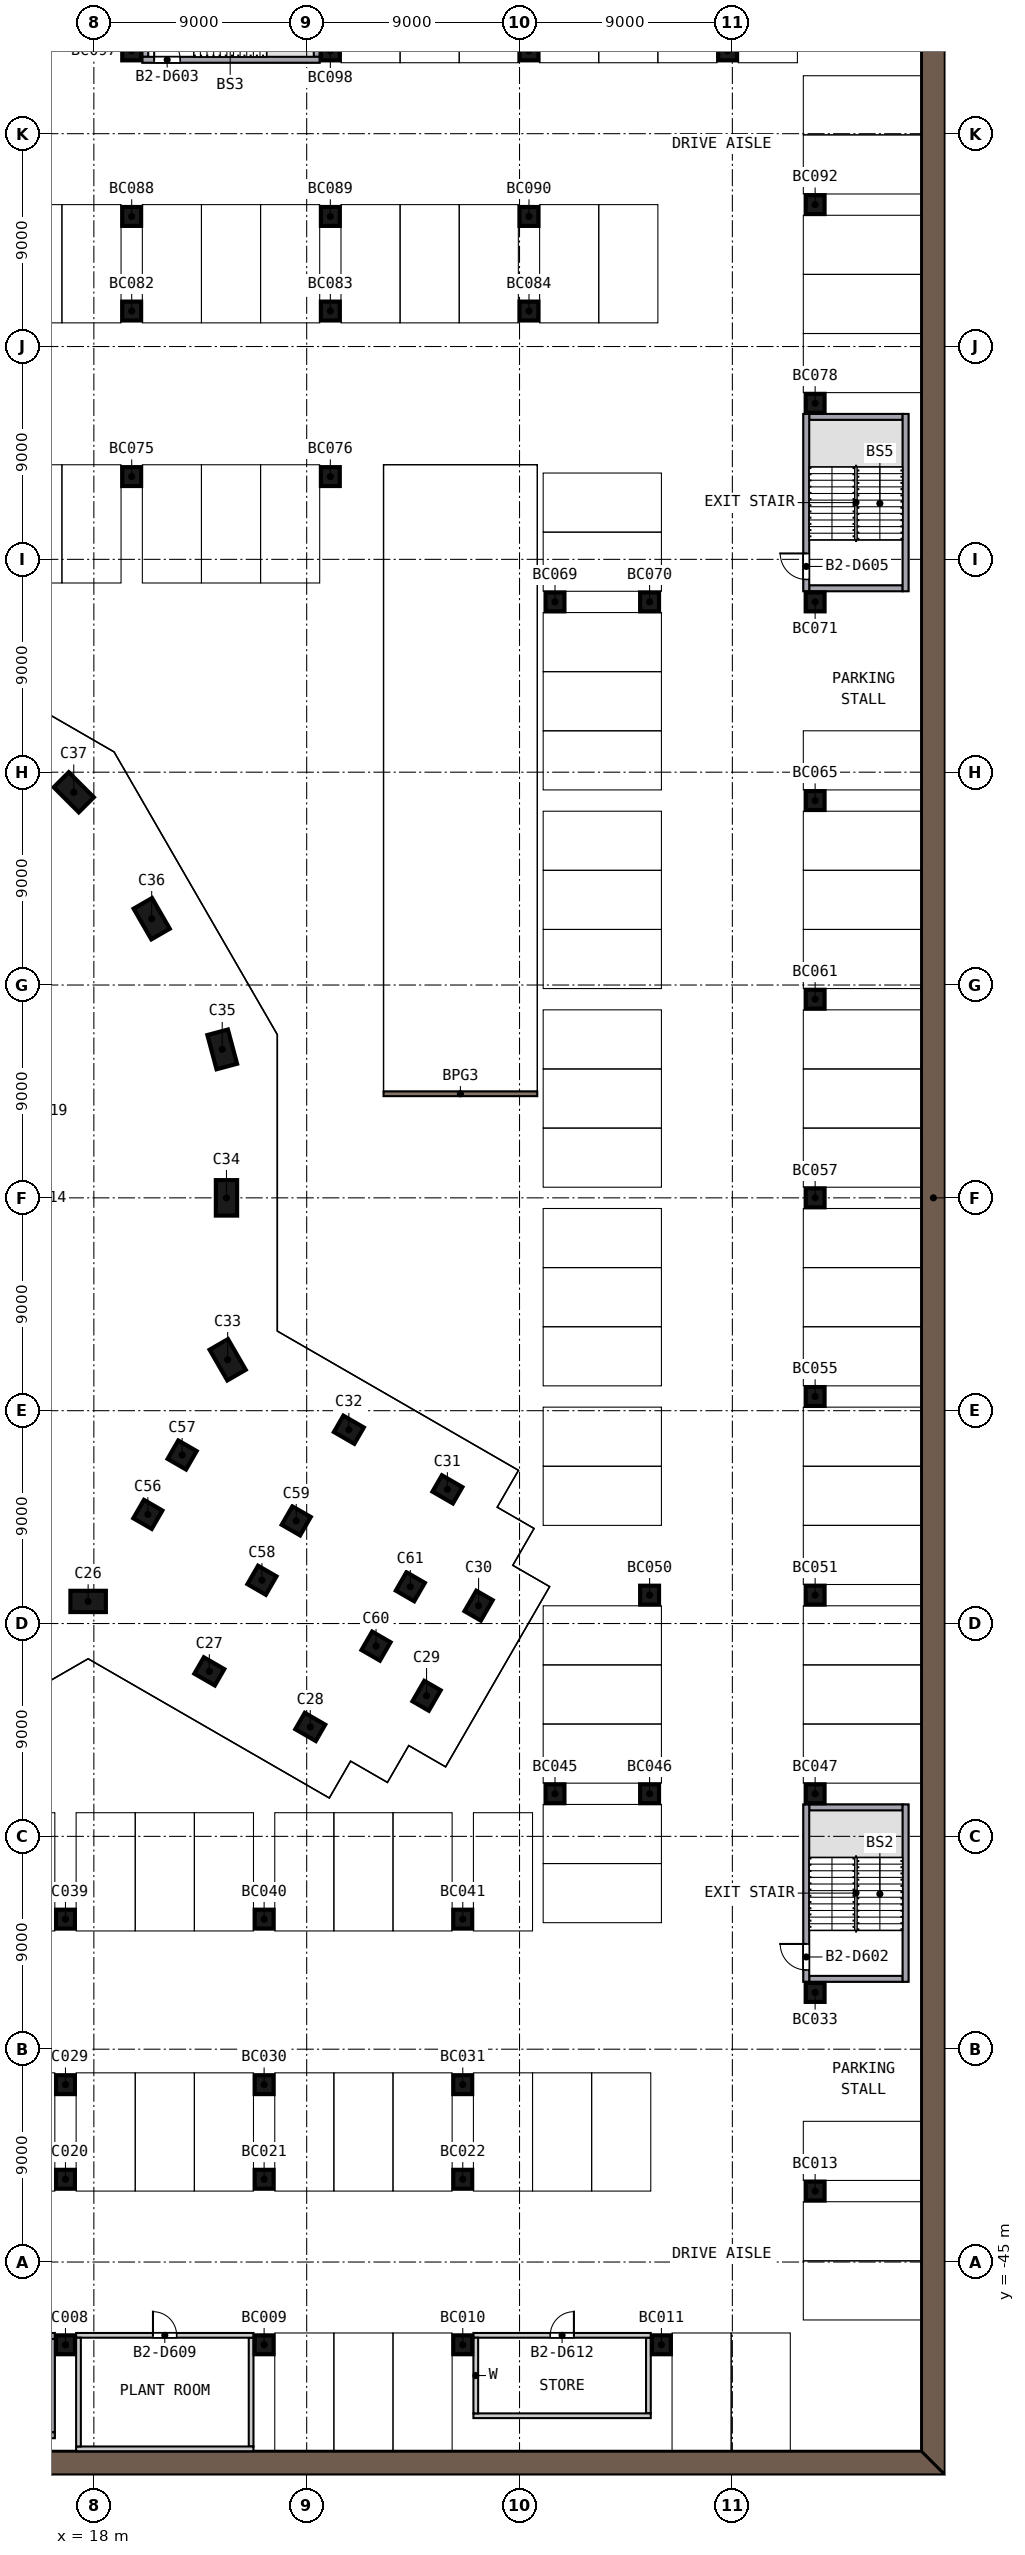
"""IFC4 building model, lengths in metres.
Left out: names, types, materials, properties, quantities, classifications, styles, units other than length and angle.
Written with IfcOpenShell. Run it as: python <this file> out.ifc"""

import sys

from ifc_helpers import new_model, si_unit, direction, frame, frame_2d, origin, origin_2d, place, context, subcontext, project, spatial, polyline, rectangle, outline, extrude, element, fill, save


model = new_model("IFC4")
c1 = context("Model", 3, precision=1e-05, world=origin(), true_north=direction((0.0, 1.0)))
c2 = subcontext(c1, "Body", "Model", "MODEL_VIEW")
j1 = project(units=[si_unit("LENGTHUNIT", "METRE"), si_unit("PLANEANGLEUNIT", "RADIAN")], contexts=[c1])
p1 = place(None, origin())
s1 = spatial("IfcSite", under=j1, at=p1, CompositionType="ELEMENT")
p2 = place(p1, origin())
s2 = spatial("IfcBuilding", under=s1, at=p2, CompositionType="ELEMENT")
p3 = place(p2, frame((0.0, 0.0, -7.8)))
s3 = spatial("IfcBuildingStorey", under=s2, at=p3, CompositionType="ELEMENT", Elevation=-7.8)
p4 = place(p3, frame((17.758, -17.065, 0.0), z_axis=(0.0, 0.0, 1.0), x_axis=(-1.0, 0.0, 0.0)))
e1 = element("IfcColumn", 1, at=p4, inside=s3, PredefinedType="COLUMN", context=c2, shape_type="SweptSolid", body=[
    extrude(rectangle(XDim=1.5, YDim=0.9, at=origin_2d()), origin(), (0.0, 0.0, 1.0), 3.45),
])
for number, where, z_axis, x_axis in (
    (2, (22.883, -20.024, 0.0), (0.0, 0.0, 1.0), (0.866, -0.5, 0.0)),
    (3, (27.151, -22.373, 0.0), (0.0, 0.0, 1.0), (0.866, -0.5, 0.0)),
    (4, (32.069, -21.055, 0.0), (0.0, 0.0, 1.0), (0.5, 0.866, 0.0)),
    (5, (34.269, -17.245, 0.0), (0.0, 0.0, 1.0), (0.5, 0.866, 0.0)),
    (6, (32.951, -12.327, 0.0), (0.0, 0.0, 1.0), (-0.866, 0.5, 0.0)),
    (7, (28.783, -9.805, 0.0), (0.0, 0.0, 1.0), (-0.866, 0.5, 0.0)),
):
    element("IfcColumn", number, at=place(p3, frame(where, z_axis=z_axis, x_axis=x_axis)), inside=s3, PredefinedType="COLUMN", context=c2, shape_type="SweptSolid", body=[
        extrude(rectangle(XDim=1.0, YDim=0.8, at=origin_2d()), origin(), (0.0, 0.0, 1.0), 3.45),
    ])
for number, where, z_axis, x_axis in (
    (8, (23.658, -6.846, 0.0), (0.0, 0.0, 1.0), (0.5, -0.866, 0.0)),
    (9, (23.608, 0.0, 0.0), (0.0, 0.0, 1.0), (0.0, 1.0, 0.0)),
    (10, (23.428, 6.278, 0.0), (0.0, 0.0, 1.0), (0.259, -0.966, 0.0)),
    (11, (20.445, 11.804, 0.0), (0.0, 0.0, 1.0), (-0.5, 0.866, 0.0)),
    (12, (17.151, 17.151, 0.0), (0.0, 0.0, 1.0), (0.707, -0.707, 0.0)),
):
    element("IfcColumn", number, at=place(p3, frame(where, z_axis=z_axis, x_axis=x_axis)), inside=s3, PredefinedType="COLUMN", context=c2, shape_type="SweptSolid", body=[
        extrude(rectangle(XDim=1.5, YDim=0.9, at=origin_2d()), origin(), (0.0, 0.0, 1.0), 3.45),
    ])
for number, where, z_axis, x_axis in (
    (13, (20.283, -13.385, 0.0), (0.0, 0.0, 1.0), (0.866, -0.5, 0.0)),
    (14, (21.733, -10.873, 0.0), (0.0, 0.0, 1.0), (0.866, -0.5, 0.0)),
    (15, (25.108, -16.17, 0.0), (0.0, 0.0, 1.0), (0.866, -0.5, 0.0)),
    (16, (26.558, -13.659, 0.0), (0.0, 0.0, 1.0), (0.866, -0.5, 0.0)),
    (17, (29.932, -18.956, 0.0), (0.0, 0.0, 1.0), (0.866, -0.5, 0.0)),
    (18, (31.382, -16.444, 0.0), (0.0, 0.0, 1.0), (0.866, -0.5, 0.0)),
):
    element("IfcColumn", number, at=place(p3, frame(where, z_axis=z_axis, x_axis=x_axis)), inside=s3, PredefinedType="COLUMN", context=c2, shape_type="SweptSolid", body=[
        extrude(rectangle(XDim=0.9, YDim=0.9, at=origin_2d()), origin(), (0.0, 0.0, 1.0), 3.45),
    ])
p5 = place(p3, origin())
e19 = element("IfcWall", 19, at=p5, inside=s3, PredefinedType="SOLIDWALL", context=c2, shape_type="SweptSolid", body=[
    extrude(outline(polyline([(-54.0, -54.0), (54.0, -54.0), (53.0, -53.0), (-53.0, -53.0), (-54.0, -54.0)])), origin(), (0.0, 0.0, 1.0), 3.9),
])
p6 = place(p3, origin())
e20 = element("IfcWall", 20, at=p6, inside=s3, PredefinedType="SOLIDWALL", context=c2, shape_type="SweptSolid", body=[
    extrude(outline(polyline([(54.0, -54.0), (54.0, 54.0), (53.0, 53.0), (53.0, -53.0), (54.0, -54.0)])), origin(), (0.0, 0.0, 1.0), 3.9),
])
for number, where, z_axis, x_axis in (
    (21, (16.8, -48.5, 0.0), (0.0, 0.0, 1.0), (1.0, 0.0, 0.0)),
    (22, (25.2, -48.5, 0.0), (0.0, 0.0, 1.0), (1.0, 0.0, 0.0)),
    (23, (33.6, -48.5, 0.0), (0.0, 0.0, 1.0), (1.0, 0.0, 0.0)),
    (24, (42.0, -48.5, 0.0), (0.0, 0.0, 1.0), (1.0, 0.0, 0.0)),
    (25, (48.5, -42.0, 0.0), (0.0, 0.0, 1.0), (1.0, 0.0, 0.0)),
    (26, (16.8, -41.5, 0.0), (0.0, 0.0, 1.0), (1.0, 0.0, 0.0)),
    (27, (25.2, -41.5, 0.0), (0.0, 0.0, 1.0), (1.0, 0.0, 0.0)),
    (28, (33.6, -41.5, 0.0), (0.0, 0.0, 1.0), (1.0, 0.0, 0.0)),
    (29, (16.8, -37.5, 0.0), (0.0, 0.0, 1.0), (1.0, 0.0, 0.0)),
    (30, (25.2, -37.5, 0.0), (0.0, 0.0, 1.0), (1.0, 0.0, 0.0)),
    (31, (33.6, -37.5, 0.0), (0.0, 0.0, 1.0), (1.0, 0.0, 0.0)),
    (32, (48.5, -33.6, 0.0), (0.0, 0.0, 1.0), (1.0, 0.0, 0.0)),
    (33, (16.8, -30.5, 0.0), (0.0, 0.0, 1.0), (1.0, 0.0, 0.0)),
    (34, (25.2, -30.5, 0.0), (0.0, 0.0, 1.0), (1.0, 0.0, 0.0)),
    (35, (33.6, -30.5, 0.0), (0.0, 0.0, 1.0), (1.0, 0.0, 0.0)),
    (36, (37.5, -25.2, 0.0), (0.0, 0.0, 1.0), (1.0, 0.0, 0.0)),
    (37, (41.5, -25.2, 0.0), (0.0, 0.0, 1.0), (1.0, 0.0, 0.0)),
    (38, (48.5, -25.2, 0.0), (0.0, 0.0, 1.0), (1.0, 0.0, 0.0)),
    (39, (41.5, -16.8, 0.0), (0.0, 0.0, 1.0), (1.0, 0.0, 0.0)),
    (40, (48.5, -16.8, 0.0), (0.0, 0.0, 1.0), (1.0, 0.0, 0.0)),
    (41, (48.5, -8.4, 0.0), (0.0, 0.0, 1.0), (1.0, 0.0, 0.0)),
    (42, (48.5, 0.0, 0.0), (0.0, 0.0, 1.0), (1.0, 0.0, 0.0)),
    (43, (48.5, 8.4, 0.0), (0.0, 0.0, 1.0), (1.0, 0.0, 0.0)),
    (44, (48.5, 16.8, 0.0), (0.0, 0.0, 1.0), (1.0, 0.0, 0.0)),
    (45, (37.5, 25.2, 0.0), (0.0, 0.0, 1.0), (1.0, 0.0, 0.0)),
    (46, (41.5, 25.2, 0.0), (0.0, 0.0, 1.0), (1.0, 0.0, 0.0)),
    (47, (48.5, 25.2, 0.0), (0.0, 0.0, 1.0), (1.0, 0.0, 0.0)),
    (48, (19.6, 30.5, 0.0), (0.0, 0.0, 1.0), (1.0, 0.0, 0.0)),
    (49, (28.0, 30.5, 0.0), (0.0, 0.0, 1.0), (1.0, 0.0, 0.0)),
    (50, (48.5, 33.6, 0.0), (0.0, 0.0, 1.0), (1.0, 0.0, 0.0)),
    (51, (19.6, 37.5, 0.0), (0.0, 0.0, 1.0), (1.0, 0.0, 0.0)),
    (52, (28.0, 37.5, 0.0), (0.0, 0.0, 1.0), (1.0, 0.0, 0.0)),
    (53, (36.4, 37.5, 0.0), (0.0, 0.0, 1.0), (1.0, 0.0, 0.0)),
    (54, (19.6, 41.5, 0.0), (0.0, 0.0, 1.0), (1.0, 0.0, 0.0)),
    (55, (28.0, 41.5, 0.0), (0.0, 0.0, 1.0), (1.0, 0.0, 0.0)),
    (56, (36.4, 41.5, 0.0), (0.0, 0.0, 1.0), (1.0, 0.0, 0.0)),
    (57, (48.5, 42.0, 0.0), (0.0, 0.0, 1.0), (1.0, 0.0, 0.0)),
    (58, (19.6, 48.5, 0.0), (0.0, 0.0, 1.0), (1.0, 0.0, 0.0)),
    (59, (28.0, 48.5, 0.0), (0.0, 0.0, 1.0), (1.0, 0.0, 0.0)),
    (60, (36.4, 48.5, 0.0), (0.0, 0.0, 1.0), (1.0, 0.0, 0.0)),
    (61, (44.8, 48.5, 0.0), (0.0, 0.0, 1.0), (1.0, 0.0, 0.0)),
):
    element("IfcColumn", number, at=place(p3, frame(where, z_axis=z_axis, x_axis=x_axis)), inside=s3, PredefinedType="COLUMN", context=c2, shape_type="SweptSolid", body=[
        extrude(rectangle(XDim=0.8, YDim=0.8, at=origin_2d()), origin(), (0.0, 0.0, 1.0), 3.9),
    ])
p7 = place(p3, frame((36.75, 4.4, 0.0), z_axis=(0.0, 0.0, 1.0), x_axis=(-1.0, 0.0, 0.0)))
e62 = element("IfcWall", 62, at=p7, inside=s3, PredefinedType="PARAPET", context=c2, shape_type="SweptSolid", body=[
    extrude(rectangle(XDim=6.5, YDim=0.2, at=frame_2d((3.25, 0.0))), origin(), (0.0, 0.0, 1.0), 1.12),
])
p8 = place(p3, frame((48.125, -33.15, 0.0), z_axis=(0.0, 0.0, 1.0), x_axis=(0.0, 1.0, 0.0)))
e63 = element("IfcWall", 63, at=p8, inside=s3, PredefinedType="SOLIDWALL", context=c2, shape_type="SweptSolid", body=[
    extrude(rectangle(XDim=7.5, YDim=0.25, at=frame_2d((3.75, 0.0))), origin(), (0.0, 0.0, 1.0), 3.9),
])
p9 = place(p8, frame((0.5, 0.0, 0.0)))
e64 = element("IfcOpeningElement", 64, at=p9, cuts=e63, PredefinedType="OPENING", context=c2, shape_type="SweptSolid", body=[
    extrude(rectangle(XDim=1.1, YDim=2.1, at=frame_2d((0.55, 1.05))), frame((0.0, 0.135, 0.0), z_axis=(0.0, -1.0, 0.0), x_axis=(1.0, 0.0, 0.0)), (0.0, 0.0, 1.0), 0.27),
])
p10 = place(p3, frame((52.325, -33.15, 0.0), z_axis=(0.0, 0.0, 1.0), x_axis=(0.0, 1.0, 0.0)))
e65 = element("IfcWall", 65, at=p10, inside=s3, PredefinedType="SOLIDWALL", context=c2, shape_type="SweptSolid", body=[
    extrude(rectangle(XDim=7.5, YDim=0.25, at=frame_2d((3.75, 0.0))), origin(), (0.0, 0.0, 1.0), 3.9),
])
for number, where, z_axis, x_axis in (
    (66, (52.2, -33.025, 0.0), (0.0, 0.0, 1.0), (-1.0, 0.0, 0.0)),
    (67, (52.2, -25.775, 0.0), (0.0, 0.0, 1.0), (-1.0, 0.0, 0.0)),
):
    element("IfcWall", number, at=place(p3, frame(where, z_axis=z_axis, x_axis=x_axis)), inside=s3, PredefinedType="SOLIDWALL", context=c2, shape_type="SweptSolid", body=[
        extrude(rectangle(XDim=3.95, YDim=0.25, at=frame_2d((1.975, 0.0))), origin(), (0.0, 0.0, 1.0), 3.9),
    ])
p11 = place(p3, frame((20.05, 48.125, 0.0), z_axis=(0.0, 0.0, 1.0), x_axis=(1.0, 0.0, 0.0)))
e68 = element("IfcWall", 68, at=p11, inside=s3, PredefinedType="SOLIDWALL", context=c2, shape_type="SweptSolid", body=[
    extrude(rectangle(XDim=7.5, YDim=0.25, at=frame_2d((3.75, 0.0))), origin(), (0.0, 0.0, 1.0), 3.9),
])
p12 = place(p11, frame((0.5, 0.0, 0.0)))
e69 = element("IfcOpeningElement", 69, at=p12, cuts=e68, PredefinedType="OPENING", context=c2, shape_type="SweptSolid", body=[
    extrude(rectangle(XDim=1.1, YDim=2.1, at=frame_2d((0.55, 1.05))), frame((0.0, 0.135, 0.0), z_axis=(0.0, -1.0, 0.0), x_axis=(1.0, 0.0, 0.0)), (0.0, 0.0, 1.0), 0.27),
])
for number, where, z_axis, x_axis in (
    (70, (20.175, 48.25, 0.0), (0.0, 0.0, 1.0), (0.0, 1.0, 0.0)),
    (71, (27.425, 48.25, 0.0), (0.0, 0.0, 1.0), (0.0, 1.0, 0.0)),
):
    element("IfcWall", number, at=place(p3, frame(where, z_axis=z_axis, x_axis=x_axis)), inside=s3, PredefinedType="SOLIDWALL", context=c2, shape_type="SweptSolid", body=[
        extrude(rectangle(XDim=3.95, YDim=0.25, at=frame_2d((1.975, 0.0))), origin(), (0.0, 0.0, 1.0), 3.9),
    ])
p13 = place(p3, frame((48.125, 25.65, 0.0), z_axis=(0.0, 0.0, 1.0), x_axis=(0.0, 1.0, 0.0)))
e72 = element("IfcWall", 72, at=p13, inside=s3, PredefinedType="SOLIDWALL", context=c2, shape_type="SweptSolid", body=[
    extrude(rectangle(XDim=7.5, YDim=0.25, at=frame_2d((3.75, 0.0))), origin(), (0.0, 0.0, 1.0), 3.9),
])
p14 = place(p13, frame((0.5, 0.0, 0.0)))
e73 = element("IfcOpeningElement", 73, at=p14, cuts=e72, PredefinedType="OPENING", context=c2, shape_type="SweptSolid", body=[
    extrude(rectangle(XDim=1.1, YDim=2.1, at=frame_2d((0.55, 1.05))), frame((0.0, 0.135, 0.0), z_axis=(0.0, -1.0, 0.0), x_axis=(1.0, 0.0, 0.0)), (0.0, 0.0, 1.0), 0.27),
])
p15 = place(p3, frame((52.325, 25.65, 0.0), z_axis=(0.0, 0.0, 1.0), x_axis=(0.0, 1.0, 0.0)))
e74 = element("IfcWall", 74, at=p15, inside=s3, PredefinedType="SOLIDWALL", context=c2, shape_type="SweptSolid", body=[
    extrude(rectangle(XDim=7.5, YDim=0.25, at=frame_2d((3.75, 0.0))), origin(), (0.0, 0.0, 1.0), 3.9),
])
for number, where, z_axis, x_axis in (
    (75, (52.2, 25.775, 0.0), (0.0, 0.0, 1.0), (-1.0, 0.0, 0.0)),
    (76, (52.2, 33.025, 0.0), (0.0, 0.0, 1.0), (-1.0, 0.0, 0.0)),
):
    element("IfcWall", number, at=place(p3, frame(where, z_axis=z_axis, x_axis=x_axis)), inside=s3, PredefinedType="SOLIDWALL", context=c2, shape_type="SweptSolid", body=[
        extrude(rectangle(XDim=3.95, YDim=0.25, at=frame_2d((1.975, 0.0))), origin(), (0.0, 0.0, 1.0), 3.9),
    ])
p16 = place(p3, frame((8.85, -48.125, 0.0), z_axis=(0.0, 0.0, 1.0), x_axis=(1.0, 0.0, 0.0)))
e77 = element("IfcWall", 77, at=p16, inside=s3, PredefinedType="SOLIDWALL", context=c2, shape_type="SweptSolid", body=[
    extrude(rectangle(XDim=7.5, YDim=0.25, at=frame_2d((3.75, 0.0))), origin(), (0.0, 0.0, 1.0), 3.9),
])
p17 = place(p16, frame((0.5, 0.0, 0.0)))
e78 = element("IfcOpeningElement", 78, at=p17, cuts=e77, PredefinedType="OPENING", context=c2, shape_type="SweptSolid", body=[
    extrude(rectangle(XDim=1.1, YDim=2.1, at=frame_2d((0.55, 1.05))), frame((0.0, 0.135, 0.0), z_axis=(0.0, -1.0, 0.0), x_axis=(1.0, 0.0, 0.0)), (0.0, 0.0, 1.0), 0.27),
])
p18 = place(p3, frame((8.85, -52.325, 0.0), z_axis=(0.0, 0.0, 1.0), x_axis=(1.0, 0.0, 0.0)))
e79 = element("IfcWall", 79, at=p18, inside=s3, PredefinedType="SOLIDWALL", context=c2, shape_type="SweptSolid", body=[
    extrude(rectangle(XDim=7.5, YDim=0.25, at=frame_2d((3.75, 0.0))), origin(), (0.0, 0.0, 1.0), 3.9),
])
p19 = place(p3, frame((16.225, -52.2, 0.0), z_axis=(0.0, 0.0, 1.0), x_axis=(0.0, 1.0, 0.0)))
e80 = element("IfcWall", 80, at=p19, inside=s3, PredefinedType="SOLIDWALL", context=c2, shape_type="SweptSolid", body=[
    extrude(rectangle(XDim=3.95, YDim=0.25, at=frame_2d((1.975, 0.0))), origin(), (0.0, 0.0, 1.0), 3.9),
])
p20 = place(p3, frame((17.25, -48.1, 0.0), z_axis=(0.0, 0.0, 1.0), x_axis=(1.0, 0.0, 0.0)))
e81 = element("IfcWall", 81, at=p20, inside=s3, PredefinedType="PARTITIONING", context=c2, shape_type="SweptSolid", body=[
    extrude(rectangle(XDim=7.5, YDim=0.2, at=frame_2d((3.75, 0.0))), origin(), (0.0, 0.0, 1.0), 3.45),
])
p21 = place(p20, frame((3.25, 0.0, 0.0)))
e82 = element("IfcOpeningElement", 82, at=p21, cuts=e81, PredefinedType="OPENING", context=c2, shape_type="SweptSolid", body=[
    extrude(rectangle(XDim=1.0, YDim=2.1, at=frame_2d((0.5, 1.05))), frame((0.0, 0.11, 0.0), z_axis=(0.0, -1.0, 0.0), x_axis=(1.0, 0.0, 0.0)), (0.0, 0.0, 1.0), 0.22),
])
p22 = place(p3, frame((17.25, -52.9, 0.0), z_axis=(0.0, 0.0, 1.0), x_axis=(1.0, 0.0, 0.0)))
e83 = element("IfcWall", 83, at=p22, inside=s3, PredefinedType="PARTITIONING", context=c2, shape_type="SweptSolid", body=[
    extrude(rectangle(XDim=7.5, YDim=0.2, at=frame_2d((3.75, 0.0))), origin(), (0.0, 0.0, 1.0), 3.45),
])
for number, where, z_axis, x_axis in (
    (84, (17.35, -52.8, 0.0), (0.0, 0.0, 1.0), (0.0, 1.0, 0.0)),
    (85, (24.65, -52.8, 0.0), (0.0, 0.0, 1.0), (0.0, 1.0, 0.0)),
):
    element("IfcWall", number, at=place(p3, frame(where, z_axis=z_axis, x_axis=x_axis)), inside=s3, PredefinedType="PARTITIONING", context=c2, shape_type="SweptSolid", body=[
        extrude(rectangle(XDim=4.6, YDim=0.2, at=frame_2d((2.3, 0.0))), origin(), (0.0, 0.0, 1.0), 3.45),
    ])
p23 = place(p3, frame((34.05, -48.1, 0.0), z_axis=(0.0, 0.0, 1.0), x_axis=(1.0, 0.0, 0.0)))
e86 = element("IfcWall", 86, at=p23, inside=s3, PredefinedType="PARTITIONING", context=c2, shape_type="SweptSolid", body=[
    extrude(rectangle(XDim=7.5, YDim=0.2, at=frame_2d((3.75, 0.0))), origin(), (0.0, 0.0, 1.0), 3.45),
])
p24 = place(p23, frame((3.25, 0.0, 0.0)))
e87 = element("IfcOpeningElement", 87, at=p24, cuts=e86, PredefinedType="OPENING", context=c2, shape_type="SweptSolid", body=[
    extrude(rectangle(XDim=1.0, YDim=2.1, at=frame_2d((0.5, 1.05))), frame((0.0, 0.11, 0.0), z_axis=(0.0, -1.0, 0.0), x_axis=(1.0, 0.0, 0.0)), (0.0, 0.0, 1.0), 0.22),
])
p25 = place(p3, frame((34.05, -51.5, 0.0), z_axis=(0.0, 0.0, 1.0), x_axis=(1.0, 0.0, 0.0)))
e88 = element("IfcWall", 88, at=p25, inside=s3, PredefinedType="PARTITIONING", context=c2, shape_type="SweptSolid", body=[
    extrude(rectangle(XDim=7.5, YDim=0.2, at=frame_2d((3.75, 0.0))), origin(), (0.0, 0.0, 1.0), 3.45),
])
for number, where, z_axis, x_axis in (
    (89, (34.15, -51.4, 0.0), (0.0, 0.0, 1.0), (0.0, 1.0, 0.0)),
    (90, (41.45, -51.4, 0.0), (0.0, 0.0, 1.0), (0.0, 1.0, 0.0)),
):
    element("IfcWall", number, at=place(p3, frame(where, z_axis=z_axis, x_axis=x_axis)), inside=s3, PredefinedType="PARTITIONING", context=c2, shape_type="SweptSolid", body=[
        extrude(rectangle(XDim=3.2, YDim=0.2, at=frame_2d((1.6, 0.0))), origin(), (0.0, 0.0, 1.0), 3.45),
    ])
p26 = place(p9, origin())
e91 = element("IfcDoor", 91, at=p26, inside=s3, OperationType="SINGLE_SWING_RIGHT", PredefinedType="DOOR", context=c2, shape_type="SweptSolid", body=[
    extrude(rectangle(XDim=1.1, YDim=2.1, at=frame_2d((0.55, 1.05))), frame((0.0, 0.025, 0.0), z_axis=(0.0, -1.0, 0.0), x_axis=(1.0, 0.0, 0.0)), (0.0, 0.0, 1.0), 0.05),
])
fill(e64, e91)
p27 = place(p12, origin())
e92 = element("IfcDoor", 92, at=p27, inside=s3, OperationType="SINGLE_SWING_LEFT", PredefinedType="DOOR", context=c2, shape_type="SweptSolid", body=[
    extrude(rectangle(XDim=1.1, YDim=2.1, at=frame_2d((0.55, 1.05))), frame((0.0, 0.025, 0.0), z_axis=(0.0, -1.0, 0.0), x_axis=(1.0, 0.0, 0.0)), (0.0, 0.0, 1.0), 0.05),
])
fill(e69, e92)
p28 = place(p14, origin())
e93 = element("IfcDoor", 93, at=p28, inside=s3, OperationType="SINGLE_SWING_RIGHT", PredefinedType="DOOR", context=c2, shape_type="SweptSolid", body=[
    extrude(rectangle(XDim=1.1, YDim=2.1, at=frame_2d((0.55, 1.05))), frame((0.0, 0.025, 0.0), z_axis=(0.0, -1.0, 0.0), x_axis=(1.0, 0.0, 0.0)), (0.0, 0.0, 1.0), 0.05),
])
fill(e73, e93)
p29 = place(p21, origin())
e94 = element("IfcDoor", 94, at=p29, inside=s3, OperationType="SINGLE_SWING_LEFT", PredefinedType="DOOR", context=c2, shape_type="SweptSolid", body=[
    extrude(rectangle(XDim=1.0, YDim=2.1, at=frame_2d((0.5, 1.05))), frame((0.0, 0.025, 0.0), z_axis=(0.0, -1.0, 0.0), x_axis=(1.0, 0.0, 0.0)), (0.0, 0.0, 1.0), 0.05),
])
fill(e82, e94)
p30 = place(p24, origin())
e95 = element("IfcDoor", 95, at=p30, inside=s3, OperationType="SINGLE_SWING_RIGHT", PredefinedType="DOOR", context=c2, shape_type="SweptSolid", body=[
    extrude(rectangle(XDim=1.0, YDim=2.1, at=frame_2d((0.5, 1.05))), frame((0.0, 0.025, 0.0), z_axis=(0.0, -1.0, 0.0), x_axis=(1.0, 0.0, 0.0)), (0.0, 0.0, 1.0), 0.05),
])
fill(e87, e95)
save(model, sys.argv[1])
